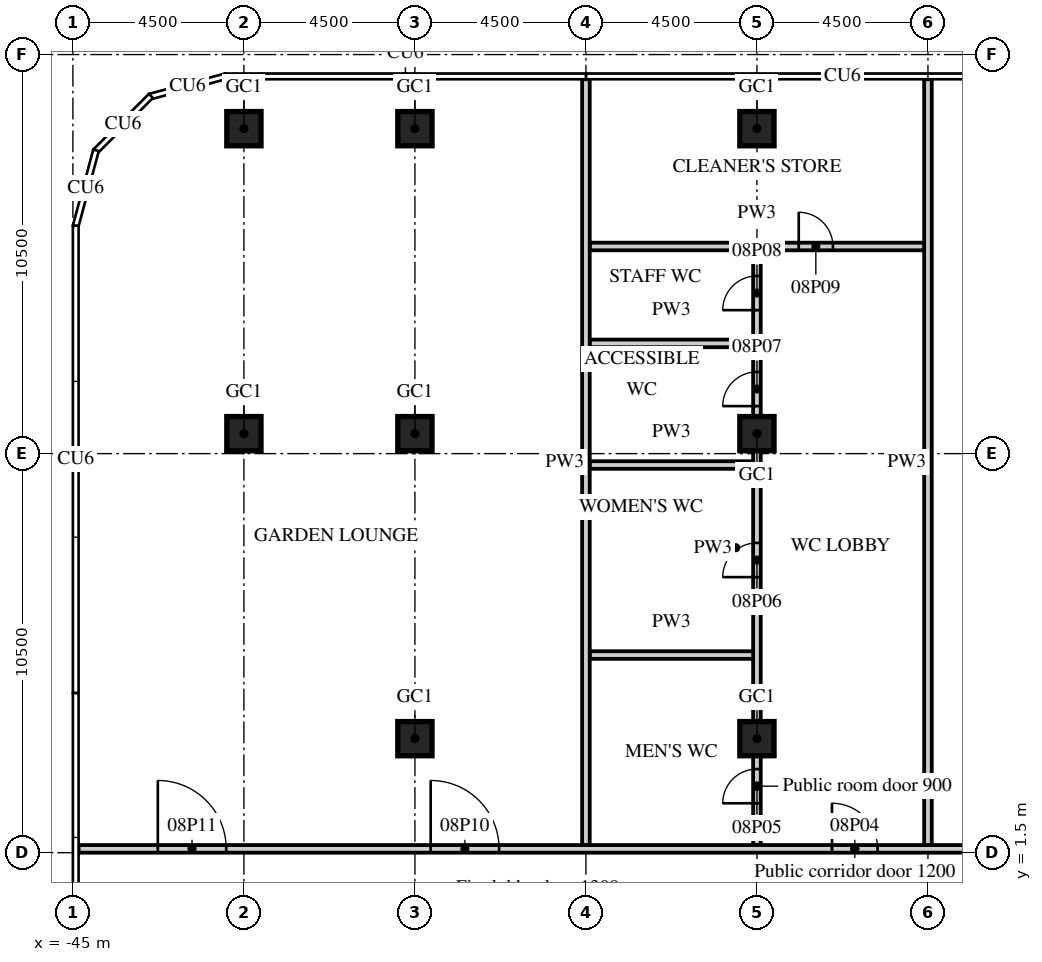
"""IFC4 building model, lengths in metres.
Left out: names, types, materials, properties, quantities, classifications, styles, units other than length and angle.
Written with IfcOpenShell. Run it as: python <this file> out.ifc"""

import sys

from ifc_helpers import new_model, si_unit, direction, frame, frame_2d, origin, origin_2d, place, context, subcontext, project, spatial, rectangle, extrude, element, fill, save


model = new_model("IFC4")
c1 = context("Model", 3, precision=1e-05, world=origin(), true_north=direction((0.0, 1.0)))
c2 = subcontext(c1, "Body", "Model", "MODEL_VIEW")
j1 = project(units=[si_unit("LENGTHUNIT", "METRE"), si_unit("PLANEANGLEUNIT", "RADIAN")], contexts=[c1])
p1 = place(None, origin())
s1 = spatial("IfcSite", under=j1, at=p1, CompositionType="ELEMENT")
p2 = place(p1, origin())
s2 = spatial("IfcBuilding", under=s1, at=p2, CompositionType="ELEMENT")
p3 = place(p2, frame((0.0, 0.0, 53.0)))
s3 = spatial("IfcBuildingStorey", under=s2, at=p3, CompositionType="ELEMENT", Elevation=53.0)
for number, where, z_axis, x_axis in (
    (1, (-40.5, 12.525, 0.0), (0.0, 0.0, 1.0), (1.0, 0.0, 0.0)),
    (2, (-40.5, 20.55, 0.0), (0.0, 0.0, 1.0), (1.0, 0.0, 0.0)),
    (3, (-36.0, 4.5, 0.0), (0.0, 0.0, 1.0), (1.0, 0.0, 0.0)),
    (4, (-36.0, 12.525, 0.0), (0.0, 0.0, 1.0), (1.0, 0.0, 0.0)),
    (5, (-36.0, 20.55, 0.0), (0.0, 0.0, 1.0), (1.0, 0.0, 0.0)),
    (6, (-27.0, 4.5, 0.0), (0.0, 0.0, 1.0), (1.0, 0.0, 0.0)),
    (7, (-27.0, 12.525, 0.0), (0.0, 0.0, 1.0), (1.0, 0.0, 0.0)),
    (8, (-27.0, 20.55, 0.0), (0.0, 0.0, 1.0), (1.0, 0.0, 0.0)),
):
    element("IfcColumn", number, at=place(p3, frame(where, z_axis=z_axis, x_axis=x_axis)), inside=s3, PredefinedType="COLUMN", context=c2, shape_type="SweptSolid", body=[
        extrude(rectangle(XDim=0.9, YDim=0.9, at=origin_2d()), origin(), (0.0, 0.0, 1.0), 5.72),
    ])
p4 = place(p3, frame((-22.5, 1.7, 0.0), z_axis=(0.0, 0.0, 1.0), x_axis=(0.0, 1.0, 0.0)))
e9 = element("IfcWall", 9, at=p4, inside=s3, PredefinedType="PARTITIONING", context=c2, shape_type="SweptSolid", body=[
    extrude(rectangle(XDim=20.15, YDim=0.2, at=frame_2d((10.075, 0.0))), origin(), (0.0, 0.0, 1.0), 6.72),
])
p5 = place(p3, frame((-27.0, 1.7, 0.0), z_axis=(0.0, 0.0, 1.0), x_axis=(0.0, 1.0, 0.0)))
e10 = element("IfcWall", 10, at=p5, inside=s3, PredefinedType="PARTITIONING", context=c2, shape_type="SweptSolid", body=[
    extrude(rectangle(XDim=15.65, YDim=0.2, at=frame_2d((7.825, 0.0))), origin(), (0.0, 0.0, 1.0), 5.72),
])
p6 = place(p5, frame((1.1, 0.0, 0.0)))
e11 = element("IfcOpeningElement", 11, at=p6, cuts=e10, PredefinedType="OPENING", context=c2, shape_type="SweptSolid", body=[
    extrude(rectangle(XDim=0.9, YDim=2.1, at=frame_2d((0.45, 1.05))), frame((0.0, 0.11, 0.0), z_axis=(0.0, -1.0, 0.0), x_axis=(1.0, 0.0, 0.0)), (0.0, 0.0, 1.0), 0.22),
])
p7 = place(p5, frame((7.05, 0.0, 0.0)))
e12 = element("IfcOpeningElement", 12, at=p7, cuts=e10, PredefinedType="OPENING", context=c2, shape_type="SweptSolid", body=[
    extrude(rectangle(XDim=0.9, YDim=2.1, at=frame_2d((0.45, 1.05))), frame((0.0, 0.11, 0.0), z_axis=(0.0, -1.0, 0.0), x_axis=(1.0, 0.0, 0.0)), (0.0, 0.0, 1.0), 0.22),
])
p8 = place(p5, frame((11.55, 0.0, 0.0)))
e13 = element("IfcOpeningElement", 13, at=p8, cuts=e10, PredefinedType="OPENING", context=c2, shape_type="SweptSolid", body=[
    extrude(rectangle(XDim=0.9, YDim=2.1, at=frame_2d((0.45, 1.05))), frame((0.0, 0.11, 0.0), z_axis=(0.0, -1.0, 0.0), x_axis=(1.0, 0.0, 0.0)), (0.0, 0.0, 1.0), 0.22),
])
p9 = place(p5, frame((14.075, 0.0, 0.0)))
e14 = element("IfcOpeningElement", 14, at=p9, cuts=e10, PredefinedType="OPENING", context=c2, shape_type="SweptSolid", body=[
    extrude(rectangle(XDim=0.9, YDim=2.1, at=frame_2d((0.45, 1.05))), frame((0.0, 0.11, 0.0), z_axis=(0.0, -1.0, 0.0), x_axis=(1.0, 0.0, 0.0)), (0.0, 0.0, 1.0), 0.22),
])
for number, where, z_axis, x_axis in (
    (15, (-31.4, 6.7, 0.0), (0.0, 0.0, 1.0), (1.0, 0.0, 0.0)),
    (16, (-31.4, 11.7, 0.0), (0.0, 0.0, 1.0), (1.0, 0.0, 0.0)),
    (17, (-31.4, 14.9, 0.0), (0.0, 0.0, 1.0), (1.0, 0.0, 0.0)),
):
    element("IfcWall", number, at=place(p3, frame(where, z_axis=z_axis, x_axis=x_axis)), inside=s3, PredefinedType="PARTITIONING", context=c2, shape_type="SweptSolid", body=[
        extrude(rectangle(XDim=4.3, YDim=0.2, at=frame_2d((2.15, 0.0))), origin(), (0.0, 0.0, 1.0), 5.72),
    ])
p10 = place(p3, frame((-31.4, 17.45, 0.0), z_axis=(0.0, 0.0, 1.0), x_axis=(1.0, 0.0, 0.0)))
e18 = element("IfcWall", 18, at=p10, inside=s3, PredefinedType="PARTITIONING", context=c2, shape_type="SweptSolid", body=[
    extrude(rectangle(XDim=8.8, YDim=0.2, at=frame_2d((4.4, 0.0))), origin(), (0.0, 0.0, 1.0), 5.72),
])
p11 = place(p10, frame((5.5, 0.0, 0.0)))
e19 = element("IfcOpeningElement", 19, at=p11, cuts=e18, PredefinedType="OPENING", context=c2, shape_type="SweptSolid", body=[
    extrude(rectangle(XDim=0.9, YDim=2.1, at=frame_2d((0.45, 1.05))), frame((0.0, 0.11, 0.0), z_axis=(0.0, -1.0, 0.0), x_axis=(1.0, 0.0, 0.0)), (0.0, 0.0, 1.0), 0.22),
])
p12 = place(p3, frame((-31.5, 1.7, 0.0), z_axis=(0.0, 0.0, 1.0), x_axis=(0.0, 1.0, 0.0)))
e20 = element("IfcWall", 20, at=p12, inside=s3, PredefinedType="PARTITIONING", context=c2, shape_type="SweptSolid", body=[
    extrude(rectangle(XDim=20.15, YDim=0.2, at=frame_2d((10.075, 0.0))), origin(), (0.0, 0.0, 1.0), 6.72),
])
p13 = place(p3, frame((-44.85, 1.6, 0.0), z_axis=(0.0, 0.0, 1.0), x_axis=(1.0, 0.0, 0.0)))
e21 = element("IfcWall", 21, at=p13, inside=s3, PredefinedType="PARTITIONING", context=c2, shape_type="SweptSolid", body=[
    extrude(rectangle(XDim=58.15, YDim=0.2, at=frame_2d((29.075, 0.0))), origin(), (0.0, 0.0, 1.0), 5.72),
])
p14 = place(p13, frame((54.3, 0.0, 0.0)))
e22 = element("IfcOpeningElement", 22, at=p14, cuts=e21, PredefinedType="OPENING", context=c2, shape_type="SweptSolid", body=[
    extrude(rectangle(XDim=1.8, YDim=2.1, at=frame_2d((0.9, 1.05))), frame((0.0, 0.11, 0.0), z_axis=(0.0, -1.0, 0.0), x_axis=(1.0, 0.0, 0.0)), (0.0, 0.0, 1.0), 0.22),
])
p15 = place(p13, frame((40.31, 0.0, 0.0)))
e23 = element("IfcOpeningElement", 23, at=p15, cuts=e21, PredefinedType="OPENING", context=c2, shape_type="SweptSolid", body=[
    extrude(rectangle(XDim=1.8, YDim=2.1, at=frame_2d((0.9, 1.05))), frame((0.0, 0.11, 0.0), z_axis=(0.0, -1.0, 0.0), x_axis=(1.0, 0.0, 0.0)), (0.0, 0.0, 1.0), 0.22),
])
p16 = place(p13, frame((29.59, 0.0, 0.0)))
e24 = element("IfcOpeningElement", 24, at=p16, cuts=e21, PredefinedType="OPENING", context=c2, shape_type="SweptSolid", body=[
    extrude(rectangle(XDim=1.8, YDim=2.1, at=frame_2d((0.9, 1.05))), frame((0.0, 0.11, 0.0), z_axis=(0.0, -1.0, 0.0), x_axis=(1.0, 0.0, 0.0)), (0.0, 0.0, 1.0), 0.22),
])
p17 = place(p13, frame((19.825, 0.0, 0.0)))
e25 = element("IfcOpeningElement", 25, at=p17, cuts=e21, PredefinedType="OPENING", context=c2, shape_type="SweptSolid", body=[
    extrude(rectangle(XDim=1.2, YDim=2.1, at=frame_2d((0.6, 1.05))), frame((0.0, 0.11, 0.0), z_axis=(0.0, -1.0, 0.0), x_axis=(1.0, 0.0, 0.0)), (0.0, 0.0, 1.0), 0.22),
])
p18 = place(p13, frame((9.265, 0.0, 0.0)))
e26 = element("IfcOpeningElement", 26, at=p18, cuts=e21, PredefinedType="OPENING", context=c2, shape_type="SweptSolid", body=[
    extrude(rectangle(XDim=1.8, YDim=2.1, at=frame_2d((0.9, 1.05))), frame((0.0, 0.11, 0.0), z_axis=(0.0, -1.0, 0.0), x_axis=(1.0, 0.0, 0.0)), (0.0, 0.0, 1.0), 0.22),
])
p19 = place(p13, frame((2.085, 0.0, 0.0)))
e27 = element("IfcOpeningElement", 27, at=p19, cuts=e21, PredefinedType="OPENING", context=c2, shape_type="SweptSolid", body=[
    extrude(rectangle(XDim=1.8, YDim=2.1, at=frame_2d((0.9, 1.05))), frame((0.0, 0.11, 0.0), z_axis=(0.0, -1.0, 0.0), x_axis=(1.0, 0.0, 0.0)), (0.0, 0.0, 1.0), 0.22),
])
p20 = place(p17, origin())
e28 = element("IfcDoor", 28, at=p20, inside=s3, OperationType="SINGLE_SWING_LEFT", PredefinedType="DOOR", context=c2, shape_type="SweptSolid", body=[
    extrude(rectangle(XDim=1.2, YDim=2.1, at=frame_2d((0.6, 1.05))), frame((0.0, 0.025, 0.0), z_axis=(0.0, -1.0, 0.0), x_axis=(1.0, 0.0, 0.0)), (0.0, 0.0, 1.0), 0.05),
])
fill(e25, e28)
p21 = place(p6, origin())
e29 = element("IfcDoor", 29, at=p21, inside=s3, OperationType="SINGLE_SWING_LEFT", PredefinedType="DOOR", context=c2, shape_type="SweptSolid", body=[
    extrude(rectangle(XDim=0.9, YDim=2.1, at=frame_2d((0.45, 1.05))), frame((0.0, 0.025, 0.0), z_axis=(0.0, -1.0, 0.0), x_axis=(1.0, 0.0, 0.0)), (0.0, 0.0, 1.0), 0.05),
])
fill(e11, e29)
p22 = place(p7, origin())
e30 = element("IfcDoor", 30, at=p22, inside=s3, OperationType="SINGLE_SWING_LEFT", PredefinedType="DOOR", context=c2, shape_type="SweptSolid", body=[
    extrude(rectangle(XDim=0.9, YDim=2.1, at=frame_2d((0.45, 1.05))), frame((0.0, 0.025, 0.0), z_axis=(0.0, -1.0, 0.0), x_axis=(1.0, 0.0, 0.0)), (0.0, 0.0, 1.0), 0.05),
])
fill(e12, e30)
p23 = place(p8, origin())
e31 = element("IfcDoor", 31, at=p23, inside=s3, OperationType="SINGLE_SWING_LEFT", PredefinedType="DOOR", context=c2, shape_type="SweptSolid", body=[
    extrude(rectangle(XDim=0.9, YDim=2.1, at=frame_2d((0.45, 1.05))), frame((0.0, 0.025, 0.0), z_axis=(0.0, -1.0, 0.0), x_axis=(1.0, 0.0, 0.0)), (0.0, 0.0, 1.0), 0.05),
])
fill(e13, e31)
p24 = place(p9, origin())
e32 = element("IfcDoor", 32, at=p24, inside=s3, OperationType="SINGLE_SWING_LEFT", PredefinedType="DOOR", context=c2, shape_type="SweptSolid", body=[
    extrude(rectangle(XDim=0.9, YDim=2.1, at=frame_2d((0.45, 1.05))), frame((0.0, 0.025, 0.0), z_axis=(0.0, -1.0, 0.0), x_axis=(1.0, 0.0, 0.0)), (0.0, 0.0, 1.0), 0.05),
])
fill(e14, e32)
p25 = place(p11, origin())
e33 = element("IfcDoor", 33, at=p25, inside=s3, OperationType="SINGLE_SWING_LEFT", PredefinedType="DOOR", context=c2, shape_type="SweptSolid", body=[
    extrude(rectangle(XDim=0.9, YDim=2.1, at=frame_2d((0.45, 1.05))), frame((0.0, 0.025, 0.0), z_axis=(0.0, -1.0, 0.0), x_axis=(1.0, 0.0, 0.0)), (0.0, 0.0, 1.0), 0.05),
])
fill(e19, e33)
p26 = place(p18, origin())
e34 = element("IfcDoor", 34, at=p26, inside=s3, OperationType="DOUBLE_DOOR_DOUBLE_SWING", PredefinedType="DOOR", context=c2, shape_type="SweptSolid", body=[
    extrude(rectangle(XDim=1.8, YDim=2.1, at=frame_2d((0.9, 1.05))), frame((0.0, 0.025, 0.0), z_axis=(0.0, -1.0, 0.0), x_axis=(1.0, 0.0, 0.0)), (0.0, 0.0, 1.0), 0.05),
])
fill(e26, e34)
p27 = place(p19, origin())
e35 = element("IfcDoor", 35, at=p27, inside=s3, OperationType="DOUBLE_DOOR_DOUBLE_SWING", PredefinedType="DOOR", context=c2, shape_type="SweptSolid", body=[
    extrude(rectangle(XDim=1.8, YDim=2.1, at=frame_2d((0.9, 1.05))), frame((0.0, 0.025, 0.0), z_axis=(0.0, -1.0, 0.0), x_axis=(1.0, 0.0, 0.0)), (0.0, 0.0, 1.0), 0.05),
])
fill(e27, e35)
save(model, sys.argv[1])
